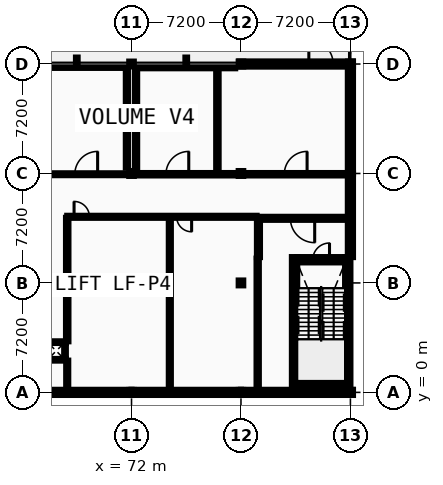
"""IFC4 building model, lengths in metres.
Left out: names, types, materials, properties, quantities, classifications, styles, units other than length and angle.
Written with IfcOpenShell. Run it as: python <this file> out.ifc"""

import sys

from ifc_helpers import new_model, si_unit, direction, frame, frame_2d, origin, origin_2d, place, context, subcontext, project, spatial, rectangle, i_section, extrude, element, fill, save


model = new_model("IFC4")
c1 = context("Model", 3, precision=1e-05, world=origin(), true_north=direction((0.0, 1.0)))
c2 = subcontext(c1, "Body", "Model", "MODEL_VIEW")
j1 = project(units=[si_unit("LENGTHUNIT", "METRE"), si_unit("PLANEANGLEUNIT", "RADIAN")], contexts=[c1])
p1 = place(None, origin())
s1 = spatial("IfcSite", under=j1, at=p1, CompositionType="ELEMENT")
p2 = place(p1, origin())
s2 = spatial("IfcBuilding", under=s1, at=p2, CompositionType="ELEMENT")
p3 = place(p2, frame((0.0, 0.0, 14.0)))
s3 = spatial("IfcBuildingStorey", under=s2, at=p3, CompositionType="ELEMENT", Elevation=14.0)
for number, where, z_axis, x_axis in (
    (1, (72.0, 0.0, 0.0), (0.0, 0.0, 1.0), (1.0, 0.0, 0.0)),
    (2, (72.0, 7.2, 0.0), (0.0, 0.0, 1.0), (1.0, 0.0, 0.0)),
    (3, (72.0, 14.4, 0.0), (0.0, 0.0, 1.0), (1.0, 0.0, 0.0)),
    (4, (72.0, 21.6, 0.0), (0.0, 0.0, 1.0), (1.0, 0.0, 0.0)),
    (5, (79.2, 0.0, 0.0), (0.0, 0.0, 1.0), (1.0, 0.0, 0.0)),
    (6, (79.2, 7.2, 0.0), (0.0, 0.0, 1.0), (1.0, 0.0, 0.0)),
    (7, (79.2, 14.4, 0.0), (0.0, 0.0, 1.0), (1.0, 0.0, 0.0)),
    (8, (79.2, 21.6, 0.0), (0.0, 0.0, 1.0), (1.0, 0.0, 0.0)),
    (9, (86.4, 0.0, 0.0), (0.0, 0.0, 1.0), (1.0, 0.0, 0.0)),
    (10, (86.4, 14.4, 0.0), (0.0, 0.0, 1.0), (1.0, 0.0, 0.0)),
    (11, (86.4, 21.6, 0.0), (0.0, 0.0, 1.0), (1.0, 0.0, 0.0)),
):
    element("IfcColumn", number, at=place(p3, frame(where, z_axis=z_axis, x_axis=x_axis)), inside=s3, PredefinedType="COLUMN", context=c2, shape_type="SweptSolid", body=[
        extrude(i_section(OverallWidth=0.3, OverallDepth=0.32, WebThickness=0.011, FlangeThickness=0.021, FilletRadius=0.027, at=origin_2d()), origin(), (0.0, 0.0, 1.0), 4.4),
    ])
p4 = place(p3, frame((64.8, 0.0, 0.0), z_axis=(0.0, 0.0, 1.0), x_axis=(1.0, 0.0, 0.0)))
e12 = element("IfcWall", 12, at=p4, inside=s3, PredefinedType="STANDARD", context=c2, shape_type="SweptSolid", body=[
    extrude(rectangle(XDim=7.2, YDim=0.34, at=frame_2d((3.6, 0.0))), origin(), (0.0, 0.0, 1.0), 3.935),
])
p5 = place(p4, frame((4.491, 0.0, 0.95)))
e13 = element("IfcOpeningElement", 13, at=p5, cuts=e12, PredefinedType="OPENING", context=c2, shape_type="SweptSolid", body=[
    extrude(rectangle(XDim=1.098, YDim=1.332, at=frame_2d((0.549, 0.666))), frame((0.0, 0.18, 0.0), z_axis=(0.0, -1.0, 0.0), x_axis=(1.0, 0.0, 0.0)), (0.0, 0.0, 1.0), 0.36),
])
p6 = place(p3, frame((72.0, 0.0, 0.0), z_axis=(0.0, 0.0, 1.0), x_axis=(1.0, 0.0, 0.0)))
e14 = element("IfcWall", 14, at=p6, inside=s3, PredefinedType="STANDARD", context=c2, shape_type="SweptSolid", body=[
    extrude(rectangle(XDim=7.2, YDim=0.34, at=frame_2d((3.6, 0.0))), origin(), (0.0, 0.0, 1.0), 3.935),
])
p7 = place(p3, frame((79.2, 0.0, 0.0), z_axis=(0.0, 0.0, 1.0), x_axis=(1.0, 0.0, 0.0)))
e15 = element("IfcWall", 15, at=p7, inside=s3, PredefinedType="STANDARD", context=c2, shape_type="SweptSolid", body=[
    extrude(rectangle(XDim=7.37, YDim=0.34, at=frame_2d((3.685, 0.0))), origin(), (0.0, 0.0, 1.0), 3.935),
])
p8 = place(p7, frame((1.628, 0.0, 0.95)))
e16 = element("IfcOpeningElement", 16, at=p8, cuts=e15, PredefinedType="OPENING", context=c2, shape_type="SweptSolid", body=[
    extrude(rectangle(XDim=1.166, YDim=1.332, at=frame_2d((0.583, 0.666))), frame((0.0, 0.18, 0.0), z_axis=(0.0, -1.0, 0.0), x_axis=(1.0, 0.0, 0.0)), (0.0, 0.0, 1.0), 0.36),
])
p9 = place(p7, frame((4.576, 0.0, 0.95)))
e17 = element("IfcOpeningElement", 17, at=p9, cuts=e15, PredefinedType="OPENING", context=c2, shape_type="SweptSolid", body=[
    extrude(rectangle(XDim=1.166, YDim=1.332, at=frame_2d((0.583, 0.666))), frame((0.0, 0.18, 0.0), z_axis=(0.0, -1.0, 0.0), x_axis=(1.0, 0.0, 0.0)), (0.0, 0.0, 1.0), 0.36),
])
p10 = place(p3, frame((86.57, 21.6, 0.0), z_axis=(0.0, 0.0, 1.0), x_axis=(-1.0, 0.0, 0.0)))
e18 = element("IfcWall", 18, at=p10, inside=s3, PredefinedType="STANDARD", context=c2, shape_type="SweptSolid", body=[
    extrude(rectangle(XDim=7.48, YDim=0.34, at=frame_2d((3.74, 0.0))), origin(), (0.0, 0.0, 1.0), 3.935),
])
p11 = place(p10, frame((1.305, 0.0, 0.0)))
e19 = element("IfcOpeningElement", 19, at=p11, cuts=e18, PredefinedType="OPENING", context=c2, shape_type="SweptSolid", body=[
    extrude(rectangle(XDim=1.6, YDim=2.2, at=frame_2d((0.8, 1.1))), frame((0.0, 0.18, 0.0), z_axis=(0.0, -1.0, 0.0), x_axis=(1.0, 0.0, 0.0)), (0.0, 0.0, 1.0), 0.36),
])
p12 = place(p3, frame((86.4, 8.9, 0.0), z_axis=(0.0, 0.0, 1.0), x_axis=(0.0, 1.0, 0.0)))
e20 = element("IfcWall", 20, at=p12, inside=s3, PredefinedType="STANDARD", context=c2, shape_type="SweptSolid", body=[
    extrude(rectangle(XDim=5.5, YDim=0.34, at=frame_2d((2.75, 0.0))), origin(), (0.0, 0.0, 1.0), 4.2),
])
p13 = place(p3, frame((86.4, 14.4, 0.0), z_axis=(0.0, 0.0, 1.0), x_axis=(0.0, 1.0, 0.0)))
e21 = element("IfcWall", 21, at=p13, inside=s3, PredefinedType="STANDARD", context=c2, shape_type="SweptSolid", body=[
    extrude(rectangle(XDim=7.03, YDim=0.34, at=frame_2d((3.515, 0.0))), origin(), (0.0, 0.0, 1.0), 3.885),
])
p14 = place(p13, frame((1.628, 0.0, 0.95)))
e22 = element("IfcOpeningElement", 22, at=p14, cuts=e21, PredefinedType="OPENING", context=c2, shape_type="SweptSolid", body=[
    extrude(rectangle(XDim=0.962, YDim=1.368, at=frame_2d((0.481, 0.684))), frame((0.0, 0.18, 0.0), z_axis=(0.0, -1.0, 0.0), x_axis=(1.0, 0.0, 0.0)), (0.0, 0.0, 1.0), 0.36),
])
p15 = place(p13, frame((4.44, 0.0, 0.95)))
e23 = element("IfcOpeningElement", 23, at=p15, cuts=e21, PredefinedType="OPENING", context=c2, shape_type="SweptSolid", body=[
    extrude(rectangle(XDim=0.962, YDim=1.368, at=frame_2d((0.481, 0.684))), frame((0.0, 0.18, 0.0), z_axis=(0.0, -1.0, 0.0), x_axis=(1.0, 0.0, 0.0)), (0.0, 0.0, 1.0), 0.36),
])
p16 = place(p3, frame((82.9, 0.575, 0.0), z_axis=(0.0, 0.0, 1.0), x_axis=(1.0, 0.0, 0.0)))
e24 = element("IfcWall", 24, at=p16, inside=s3, PredefinedType="SHEAR", context=c2, shape_type="SweptSolid", body=[
    extrude(rectangle(XDim=3.15, YDim=0.35, at=frame_2d((1.575, 0.0))), origin(), (0.0, 0.0, 1.0), 4.2),
])
p17 = place(p3, frame((82.9, 8.725, 0.0), z_axis=(0.0, 0.0, 1.0), x_axis=(1.0, 0.0, 0.0)))
e25 = element("IfcWall", 25, at=p17, inside=s3, PredefinedType="SHEAR", context=c2, shape_type="SweptSolid", body=[
    extrude(rectangle(XDim=3.15, YDim=0.35, at=frame_2d((1.575, 0.0))), origin(), (0.0, 0.0, 1.0), 4.2),
])
p18 = place(p17, frame((1.025, 0.0, 0.0)))
e26 = element("IfcOpeningElement", 26, at=p18, cuts=e25, PredefinedType="OPENING", context=c2, shape_type="SweptSolid", body=[
    extrude(rectangle(XDim=1.1, YDim=2.15, at=frame_2d((0.55, 1.075))), frame((0.0, 0.185, 0.0), z_axis=(0.0, -1.0, 0.0), x_axis=(1.0, 0.0, 0.0)), (0.0, 0.0, 1.0), 0.37),
])
for number, where, z_axis, x_axis in (
    (27, (82.725, 0.17, 0.0), (0.0, 0.0, 1.0), (0.0, 1.0, 0.0)),
    (28, (86.225, 0.17, 0.0), (0.0, 0.0, 1.0), (0.0, 1.0, 0.0)),
):
    element("IfcWall", number, at=place(p3, frame(where, z_axis=z_axis, x_axis=x_axis)), inside=s3, PredefinedType="SHEAR", context=c2, shape_type="SweptSolid", body=[
        extrude(rectangle(XDim=8.73, YDim=0.35, at=frame_2d((4.365, 0.0))), origin(), (0.0, 0.0, 1.0), 4.2),
    ])
p19 = place(p3, frame((80.45, 11.45, 0.0), z_axis=(0.0, 0.0, 1.0), x_axis=(1.0, 0.0, 0.0)))
e29 = element("IfcWall", 29, at=p19, inside=s3, PredefinedType="PARTITIONING", context=c2, shape_type="SweptSolid", body=[
    extrude(rectangle(XDim=5.6, YDim=0.2, at=frame_2d((2.8, 0.0))), origin(), (0.0, 0.0, 1.0), 4.2),
])
p20 = place(p19, frame((2.0, 0.0, 0.0)))
e30 = element("IfcOpeningElement", 30, at=p20, cuts=e29, PredefinedType="OPENING", context=c2, shape_type="SweptSolid", body=[
    extrude(rectangle(XDim=1.6, YDim=2.2, at=frame_2d((0.8, 1.1))), frame((0.0, 0.11, 0.0), z_axis=(0.0, -1.0, 0.0), x_axis=(1.0, 0.0, 0.0)), (0.0, 0.0, 1.0), 0.22),
])
p21 = place(p3, frame((80.35, 8.9, 0.0), z_axis=(0.0, 0.0, 1.0), x_axis=(0.0, 1.0, 0.0)))
e31 = element("IfcWall", 31, at=p21, inside=s3, PredefinedType="PARTITIONING", context=c2, shape_type="SweptSolid", body=[
    extrude(rectangle(XDim=2.45, YDim=0.2, at=frame_2d((1.225, 0.0))), origin(), (0.0, 0.0, 1.0), 4.2),
])
for number, where, z_axis, x_axis in (
    (32, (66.41, 2.145, 0.0), (0.0, 0.0, 1.0), (1.0, 0.0, 0.0)),
    (33, (66.41, 3.305, 0.0), (0.0, 0.0, 1.0), (1.0, 0.0, 0.0)),
):
    element("IfcWall", number, at=place(p3, frame(where, z_axis=z_axis, x_axis=x_axis)), inside=s3, PredefinedType="PARTITIONING", context=c2, shape_type="SweptSolid", body=[
        extrude(rectangle(XDim=1.27, YDim=0.11, at=frame_2d((0.635, 0.0))), origin(), (0.0, 0.0, 1.0), 4.2),
    ])
p22 = place(p3, frame((67.625, 2.2, 0.0), z_axis=(0.0, 0.0, 1.0), x_axis=(0.0, 1.0, 0.0)))
e34 = element("IfcWall", 34, at=p22, inside=s3, PredefinedType="PARTITIONING", context=c2, shape_type="SweptSolid", body=[
    extrude(rectangle(XDim=1.05, YDim=0.11, at=frame_2d((0.525, 0.0))), origin(), (0.0, 0.0, 1.0), 4.2),
])
p23 = place(p3, frame((67.77, 11.55, 0.0), z_axis=(0.0, 0.0, 1.0), x_axis=(1.0, 0.0, 0.0)))
e35 = element("IfcWall", 35, at=p23, inside=s3, PredefinedType="PARTITIONING", context=c2, shape_type="SweptSolid", body=[
    extrude(rectangle(XDim=12.46, YDim=0.135, at=frame_2d((6.23, 0.0))), origin(), (0.0, 0.0, 1.0), 4.2),
])
p24 = place(p23, frame((7.2, 0.0, 0.0)))
e36 = element("IfcOpeningElement", 36, at=p24, cuts=e35, PredefinedType="OPENING", context=c2, shape_type="SweptSolid", body=[
    extrude(rectangle(XDim=0.984, YDim=2.04, at=frame_2d((0.492, 1.02))), frame((0.0, 0.078, 0.0), z_axis=(0.0, -1.0, 0.0), x_axis=(1.0, 0.0, 0.0)), (0.0, 0.0, 1.0), 0.155),
])
p25 = place(p23, frame((0.45, 0.0, 0.0)))
e37 = element("IfcOpeningElement", 37, at=p25, cuts=e35, PredefinedType="OPENING", context=c2, shape_type="SweptSolid", body=[
    extrude(rectangle(XDim=1.01, YDim=2.04, at=frame_2d((0.505, 1.02))), frame((0.0, 0.078, 0.0), z_axis=(0.0, -1.0, 0.0), x_axis=(1.0, 0.0, 0.0)), (0.0, 0.0, 1.0), 0.155),
])
p26 = place(p3, frame((65.18, 14.35, 0.0), z_axis=(0.0, 0.0, 1.0), x_axis=(1.0, 0.0, 0.0)))
e38 = element("IfcWall", 38, at=p26, inside=s3, PredefinedType="PARTITIONING", context=c2, shape_type="SweptSolid", body=[
    extrude(rectangle(XDim=6.44, YDim=0.125, at=frame_2d((3.22, 0.0))), origin(), (0.0, 0.0, 1.0), 3.935),
])
p27 = place(p26, frame((3.09, 0.0, 0.0)))
e39 = element("IfcOpeningElement", 39, at=p27, cuts=e38, PredefinedType="OPENING", context=c2, shape_type="SweptSolid", body=[
    extrude(rectangle(XDim=1.5, YDim=2.2, at=frame_2d((0.75, 1.1))), frame((0.0, 0.073, 0.0), z_axis=(0.0, -1.0, 0.0), x_axis=(1.0, 0.0, 0.0)), (0.0, 0.0, 1.0), 0.145),
])
p28 = place(p3, frame((72.38, 14.35, 0.0), z_axis=(0.0, 0.0, 1.0), x_axis=(1.0, 0.0, 0.0)))
e40 = element("IfcWall", 40, at=p28, inside=s3, PredefinedType="PARTITIONING", context=c2, shape_type="SweptSolid", body=[
    extrude(rectangle(XDim=6.44, YDim=0.16, at=frame_2d((3.22, 0.0))), origin(), (0.0, 0.0, 1.0), 3.935),
])
p29 = place(p28, frame((1.885, 0.0, 0.0)))
e41 = element("IfcOpeningElement", 41, at=p29, cuts=e40, PredefinedType="OPENING", context=c2, shape_type="SweptSolid", body=[
    extrude(rectangle(XDim=1.5, YDim=2.2, at=frame_2d((0.75, 1.1))), frame((0.0, 0.09, 0.0), z_axis=(0.0, -1.0, 0.0), x_axis=(1.0, 0.0, 0.0)), (0.0, 0.0, 1.0), 0.18),
])
p30 = place(p3, frame((79.58, 14.35, 0.0), z_axis=(0.0, 0.0, 1.0), x_axis=(1.0, 0.0, 0.0)))
e42 = element("IfcWall", 42, at=p30, inside=s3, PredefinedType="PARTITIONING", context=c2, shape_type="SweptSolid", body=[
    extrude(rectangle(XDim=6.44, YDim=0.16, at=frame_2d((3.22, 0.0))), origin(), (0.0, 0.0, 1.0), 3.935),
])
p31 = place(p30, frame((2.47, 0.0, 0.0)))
e43 = element("IfcOpeningElement", 43, at=p31, cuts=e42, PredefinedType="OPENING", context=c2, shape_type="SweptSolid", body=[
    extrude(rectangle(XDim=1.5, YDim=2.2, at=frame_2d((0.75, 1.1))), frame((0.0, 0.09, 0.0), z_axis=(0.0, -1.0, 0.0), x_axis=(1.0, 0.0, 0.0)), (0.0, 0.0, 1.0), 0.18),
])
p32 = place(p3, frame((65.18, 21.4, 0.0), z_axis=(0.0, 0.0, 1.0), x_axis=(1.0, 0.0, 0.0)))
e44 = element("IfcWall", 44, at=p32, inside=s3, PredefinedType="PARTITIONING", context=c2, shape_type="SweptSolid", body=[
    extrude(rectangle(XDim=6.44, YDim=0.11, at=frame_2d((3.22, 0.0))), origin(), (0.0, 0.0, 1.0), 3.935),
])
p33 = place(p3, frame((72.38, 21.4, 0.0), z_axis=(0.0, 0.0, 1.0), x_axis=(1.0, 0.0, 0.0)))
e45 = element("IfcWall", 45, at=p33, inside=s3, PredefinedType="PARTITIONING", context=c2, shape_type="SweptSolid", body=[
    extrude(rectangle(XDim=6.44, YDim=0.16, at=frame_2d((3.22, 0.0))), origin(), (0.0, 0.0, 1.0), 3.935),
])
p34 = place(p3, frame((67.77, 0.2, 0.0), z_axis=(0.0, 0.0, 1.0), x_axis=(0.0, 1.0, 0.0)))
e46 = element("IfcWall", 46, at=p34, inside=s3, PredefinedType="PARTITIONING", context=c2, shape_type="SweptSolid", body=[
    extrude(rectangle(XDim=1.89, YDim=0.135, at=frame_2d((0.945, 0.0))), origin(), (0.0, 0.0, 1.0), 4.2),
])
p35 = place(p3, frame((67.77, 3.36, 0.0), z_axis=(0.0, 0.0, 1.0), x_axis=(0.0, 1.0, 0.0)))
e47 = element("IfcWall", 47, at=p35, inside=s3, PredefinedType="PARTITIONING", context=c2, shape_type="SweptSolid", body=[
    extrude(rectangle(XDim=8.122, YDim=0.16, at=frame_2d((4.061, 0.0))), origin(), (0.0, 0.0, 1.0), 4.2),
])
p36 = place(p3, frame((71.7, 14.78, 0.0), z_axis=(0.0, 0.0, 1.0), x_axis=(0.0, 1.0, 0.0)))
e48 = element("IfcWall", 48, at=p36, inside=s3, PredefinedType="PARTITIONING", context=c2, shape_type="SweptSolid", body=[
    extrude(rectangle(XDim=6.44, YDim=0.15, at=frame_2d((3.22, 0.0))), origin(), (0.0, 0.0, 1.0), 3.895),
])
p37 = place(p3, frame((72.3, 14.78, 0.0), z_axis=(0.0, 0.0, 1.0), x_axis=(0.0, 1.0, 0.0)))
e49 = element("IfcWall", 49, at=p37, inside=s3, PredefinedType="PARTITIONING", context=c2, shape_type="SweptSolid", body=[
    extrude(rectangle(XDim=6.44, YDim=0.142, at=frame_2d((3.22, 0.0))), origin(), (0.0, 0.0, 1.0), 3.895),
])
p38 = place(p3, frame((74.52, 0.2, 0.0), z_axis=(0.0, 0.0, 1.0), x_axis=(0.0, 1.0, 0.0)))
e50 = element("IfcWall", 50, at=p38, inside=s3, PredefinedType="PARTITIONING", context=c2, shape_type="SweptSolid", body=[
    extrude(rectangle(XDim=11.282, YDim=0.135, at=frame_2d((5.641, 0.0))), origin(), (0.0, 0.0, 1.0), 3.945),
])
p39 = place(p3, frame((77.65, 14.43, 0.0), z_axis=(0.0, 0.0, 1.0), x_axis=(0.0, 1.0, 0.0)))
e51 = element("IfcWall", 51, at=p39, inside=s3, PredefinedType="PARTITIONING", context=c2, shape_type="SweptSolid", body=[
    extrude(rectangle(XDim=6.89, YDim=0.16, at=frame_2d((3.445, 0.0))), origin(), (0.0, 0.0, 1.0), 4.2),
])
p40 = place(p3, frame((80.3, 0.2, 0.0), z_axis=(0.0, 0.0, 1.0), x_axis=(0.0, 1.0, 0.0)))
e52 = element("IfcWall", 52, at=p40, inside=s3, PredefinedType="PARTITIONING", context=c2, shape_type="SweptSolid", body=[
    extrude(rectangle(XDim=8.6, YDim=0.15, at=frame_2d((4.3, 0.0))), origin(), (0.0, 0.0, 1.0), 4.2),
])
p41 = place(p5, origin())
e53 = element("IfcWindow", 53, at=p41, inside=s3, PartitioningType="SINGLE_PANEL", PredefinedType="WINDOW", context=c2, shape_type="SweptSolid", body=[
    extrude(rectangle(XDim=1.098, YDim=1.332, at=frame_2d((0.549, 0.666))), frame((0.0, 0.03, 0.0), z_axis=(0.0, -1.0, 0.0), x_axis=(1.0, 0.0, 0.0)), (0.0, 0.0, 1.0), 0.06),
])
fill(e13, e53)
p42 = place(p8, origin())
e54 = element("IfcWindow", 54, at=p42, inside=s3, PartitioningType="SINGLE_PANEL", PredefinedType="WINDOW", context=c2, shape_type="SweptSolid", body=[
    extrude(rectangle(XDim=1.166, YDim=1.332, at=frame_2d((0.583, 0.666))), frame((0.0, 0.03, 0.0), z_axis=(0.0, -1.0, 0.0), x_axis=(1.0, 0.0, 0.0)), (0.0, 0.0, 1.0), 0.06),
])
fill(e16, e54)
p43 = place(p9, origin())
e55 = element("IfcWindow", 55, at=p43, inside=s3, PartitioningType="SINGLE_PANEL", PredefinedType="WINDOW", context=c2, shape_type="SweptSolid", body=[
    extrude(rectangle(XDim=1.166, YDim=1.332, at=frame_2d((0.583, 0.666))), frame((0.0, 0.03, 0.0), z_axis=(0.0, -1.0, 0.0), x_axis=(1.0, 0.0, 0.0)), (0.0, 0.0, 1.0), 0.06),
])
fill(e17, e55)
p44 = place(p14, origin())
e56 = element("IfcWindow", 56, at=p44, inside=s3, PartitioningType="SINGLE_PANEL", PredefinedType="WINDOW", context=c2, shape_type="SweptSolid", body=[
    extrude(rectangle(XDim=0.962, YDim=1.368, at=frame_2d((0.481, 0.684))), frame((0.0, 0.03, 0.0), z_axis=(0.0, -1.0, 0.0), x_axis=(1.0, 0.0, 0.0)), (0.0, 0.0, 1.0), 0.06),
])
fill(e22, e56)
p45 = place(p15, origin())
e57 = element("IfcWindow", 57, at=p45, inside=s3, PartitioningType="SINGLE_PANEL", PredefinedType="WINDOW", context=c2, shape_type="SweptSolid", body=[
    extrude(rectangle(XDim=0.962, YDim=1.368, at=frame_2d((0.481, 0.684))), frame((0.0, 0.03, 0.0), z_axis=(0.0, -1.0, 0.0), x_axis=(1.0, 0.0, 0.0)), (0.0, 0.0, 1.0), 0.06),
])
fill(e23, e57)
p46 = place(p11, origin())
e58 = element("IfcDoor", 58, at=p46, inside=s3, OperationType="DOUBLE_DOOR_SINGLE_SWING", PredefinedType="DOOR", context=c2, shape_type="SweptSolid", body=[
    extrude(rectangle(XDim=1.6, YDim=2.2, at=frame_2d((0.8, 1.1))), frame((0.0, 0.025, 0.0), z_axis=(0.0, -1.0, 0.0), x_axis=(1.0, 0.0, 0.0)), (0.0, 0.0, 1.0), 0.05),
])
fill(e19, e58)
p47 = place(p18, frame((1.1, 0.0, 0.0), z_axis=(0.0, 0.0, 1.0), x_axis=(-1.0, 0.0, 0.0)))
e59 = element("IfcDoor", 59, at=p47, inside=s3, OperationType="SINGLE_SWING_RIGHT", PredefinedType="DOOR", context=c2, shape_type="SweptSolid", body=[
    extrude(rectangle(XDim=1.1, YDim=2.15, at=frame_2d((0.55, 1.075))), frame((0.0, 0.025, 0.0), z_axis=(0.0, -1.0, 0.0), x_axis=(1.0, 0.0, 0.0)), (0.0, 0.0, 1.0), 0.05),
])
fill(e26, e59)
p48 = place(p20, origin())
e60 = element("IfcDoor", 60, at=p48, inside=s3, OperationType="DOUBLE_DOOR_SINGLE_SWING", PredefinedType="DOOR", context=c2, shape_type="SweptSolid", body=[
    extrude(rectangle(XDim=1.6, YDim=2.2, at=frame_2d((0.8, 1.1))), frame((0.0, 0.025, 0.0), z_axis=(0.0, -1.0, 0.0), x_axis=(1.0, 0.0, 0.0)), (0.0, 0.0, 1.0), 0.05),
])
fill(e30, e60)
p49 = place(p27, frame((1.5, 0.0, 0.0), z_axis=(0.0, 0.0, 1.0), x_axis=(-1.0, 0.0, 0.0)))
e61 = element("IfcDoor", 61, at=p49, inside=s3, OperationType="DOUBLE_DOOR_SINGLE_SWING", PredefinedType="DOOR", context=c2, shape_type="SweptSolid", body=[
    extrude(rectangle(XDim=1.5, YDim=2.2, at=frame_2d((0.75, 1.1))), frame((0.0, 0.025, 0.0), z_axis=(0.0, -1.0, 0.0), x_axis=(1.0, 0.0, 0.0)), (0.0, 0.0, 1.0), 0.05),
])
fill(e39, e61)
p50 = place(p29, frame((1.5, 0.0, 0.0), z_axis=(0.0, 0.0, 1.0), x_axis=(-1.0, 0.0, 0.0)))
e62 = element("IfcDoor", 62, at=p50, inside=s3, OperationType="DOUBLE_DOOR_SINGLE_SWING", PredefinedType="DOOR", context=c2, shape_type="SweptSolid", body=[
    extrude(rectangle(XDim=1.5, YDim=2.2, at=frame_2d((0.75, 1.1))), frame((0.0, 0.025, 0.0), z_axis=(0.0, -1.0, 0.0), x_axis=(1.0, 0.0, 0.0)), (0.0, 0.0, 1.0), 0.05),
])
fill(e41, e62)
p51 = place(p31, frame((1.5, 0.0, 0.0), z_axis=(0.0, 0.0, 1.0), x_axis=(-1.0, 0.0, 0.0)))
e63 = element("IfcDoor", 63, at=p51, inside=s3, OperationType="DOUBLE_DOOR_SINGLE_SWING", PredefinedType="DOOR", context=c2, shape_type="SweptSolid", body=[
    extrude(rectangle(XDim=1.5, YDim=2.2, at=frame_2d((0.75, 1.1))), frame((0.0, 0.025, 0.0), z_axis=(0.0, -1.0, 0.0), x_axis=(1.0, 0.0, 0.0)), (0.0, 0.0, 1.0), 0.05),
])
fill(e43, e63)
p52 = place(p24, origin())
e64 = element("IfcDoor", 64, at=p52, inside=s3, OperationType="SINGLE_SWING_RIGHT", PredefinedType="DOOR", context=c2, shape_type="SweptSolid", body=[
    extrude(rectangle(XDim=0.984, YDim=2.04, at=frame_2d((0.492, 1.02))), frame((0.0, 0.025, 0.0), z_axis=(0.0, -1.0, 0.0), x_axis=(1.0, 0.0, 0.0)), (0.0, 0.0, 1.0), 0.05),
])
fill(e36, e64)
p53 = place(p25, origin())
e65 = element("IfcDoor", 65, at=p53, inside=s3, OperationType="SINGLE_SWING_LEFT", PredefinedType="DOOR", context=c2, shape_type="SweptSolid", body=[
    extrude(rectangle(XDim=1.01, YDim=2.04, at=frame_2d((0.505, 1.02))), frame((0.0, 0.025, 0.0), z_axis=(0.0, -1.0, 0.0), x_axis=(1.0, 0.0, 0.0)), (0.0, 0.0, 1.0), 0.05),
])
fill(e37, e65)
save(model, sys.argv[1])
